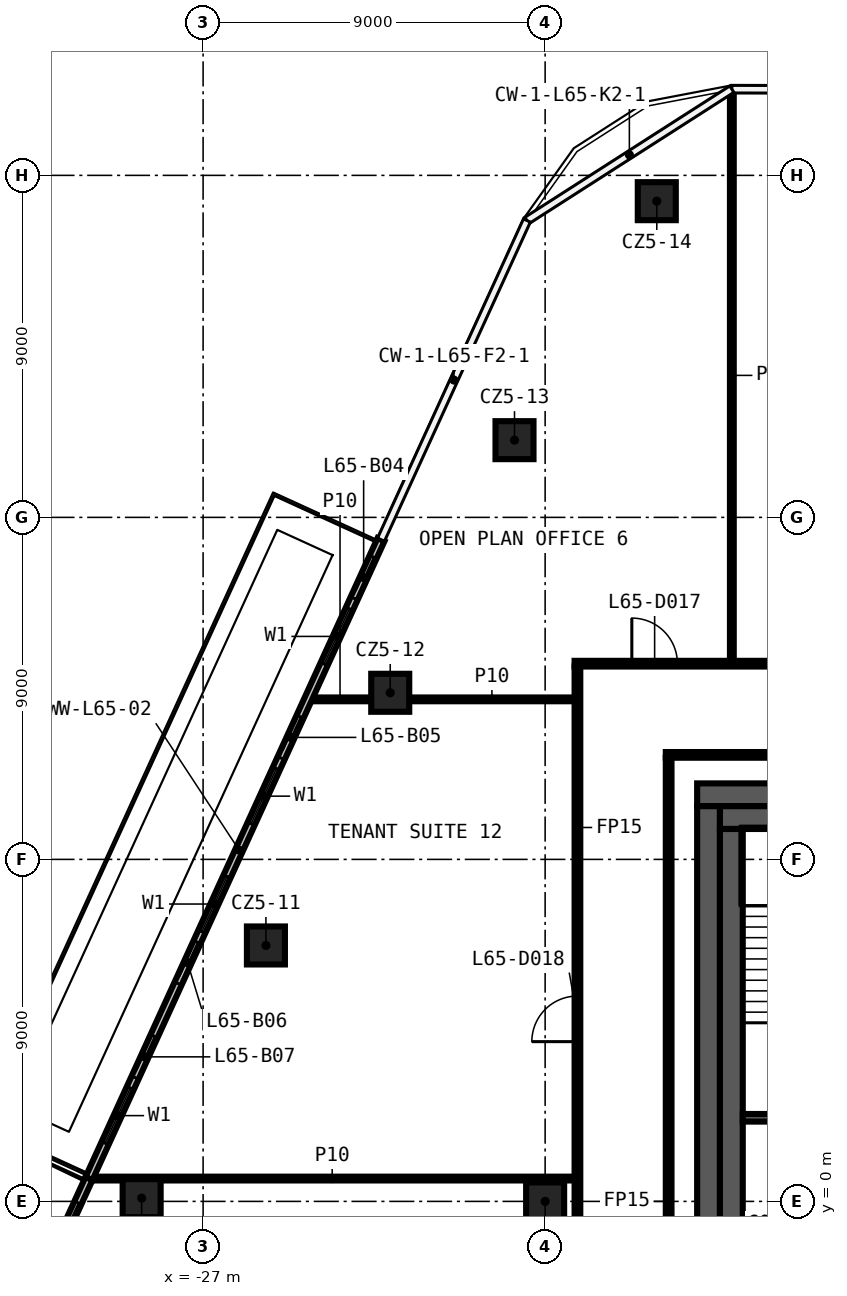
"""IFC4 building model, lengths in metres.
Left out: names, types, materials, properties, quantities, classifications, styles, units other than length and angle.
Written with IfcOpenShell. Run it as: python <this file> out.ifc"""

import sys

from ifc_helpers import new_model, si_unit, direction, frame, frame_2d, origin, origin_2d, place, context, subcontext, project, spatial, rectangle, extrude, element, fill, save


model = new_model("IFC4")
c1 = context("Model", 3, precision=1e-05, world=origin(), true_north=direction((0.0, 1.0)))
c2 = subcontext(c1, "Body", "Model", "MODEL_VIEW")
j1 = project(units=[si_unit("LENGTHUNIT", "METRE"), si_unit("PLANEANGLEUNIT", "RADIAN")], contexts=[c1])
p1 = place(None, origin())
s1 = spatial("IfcSite", under=j1, at=p1, CompositionType="ELEMENT")
p2 = place(p1, origin())
s2 = spatial("IfcBuilding", under=s1, at=p2, CompositionType="ELEMENT")
p3 = place(p2, frame((0.0, 0.0, 306.8)))
s3 = spatial("IfcBuildingStorey", under=s2, at=p3, CompositionType="ELEMENT", Elevation=306.8)
for number, where, z_axis, x_axis in (
    (1, (-28.617, 0.086, 0.0), (0.0, 0.0, 1.0), (1.0, 0.0, 0.0)),
    (2, (-25.347, 6.735, 0.0), (0.0, 0.0, 1.0), (1.0, 0.0, 0.0)),
    (3, (-22.076, 13.384, 0.0), (0.0, 0.0, 1.0), (1.0, 0.0, 0.0)),
    (4, (-18.806, 20.032, 0.0), (0.0, 0.0, 1.0), (1.0, 0.0, 0.0)),
    (5, (-15.062, 26.321, 0.0), (0.0, 0.0, 1.0), (1.0, 0.0, 0.0)),
    (6, (-18.0, 0.0, 0.0), (0.0, 0.0, 1.0), (1.0, 0.0, 0.0)),
):
    element("IfcColumn", number, at=place(p3, frame(where, z_axis=z_axis, x_axis=x_axis)), inside=s3, PredefinedType="COLUMN", context=c2, shape_type="SweptSolid", body=[
        extrude(rectangle(XDim=1.0, YDim=1.0, at=origin_2d()), origin(), (0.0, 0.0, 1.0), 3.82),
    ])
p4 = place(p3, frame((-29.981, 0.601, 0.0), z_axis=(0.0, 0.0, 1.0), x_axis=(1.0, 0.0, 0.0)))
e7 = element("IfcWall", 7, at=p4, inside=s3, PredefinedType="PARTITIONING", context=c2, shape_type="SweptSolid", body=[
    extrude(rectangle(XDim=12.756, YDim=0.1, at=frame_2d((6.378, 0.0))), origin(), (0.0, 0.0, 1.0), 3.82),
])
p5 = place(p3, frame((-14.825, 11.75, 0.0), z_axis=(0.0, 0.0, 1.0), x_axis=(1.0, 0.0, 0.0)))
e8 = element("IfcWall", 8, at=p5, inside=s3, PredefinedType="PARTITIONING", context=c2, shape_type="SweptSolid", body=[
    extrude(rectangle(XDim=16.625, YDim=0.15, at=frame_2d((8.312, 0.0))), origin(), (0.0, 0.0, 1.0), 3.82),
])
p6 = place(p3, frame((-24.218, 13.211, 0.0), z_axis=(0.0, 0.0, 1.0), x_axis=(1.0, 0.0, 0.0)))
e9 = element("IfcWall", 9, at=p6, inside=s3, PredefinedType="PARTITIONING", context=c2, shape_type="SweptSolid", body=[
    extrude(rectangle(XDim=1.642, YDim=0.1, at=frame_2d((0.821, 0.0))), origin(), (0.0, 0.0, 1.0), 3.82),
])
p7 = place(p3, frame((-21.576, 13.211, 0.0), z_axis=(0.0, 0.0, 1.0), x_axis=(1.0, 0.0, 0.0)))
e10 = element("IfcWall", 10, at=p7, inside=s3, PredefinedType="PARTITIONING", context=c2, shape_type="SweptSolid", body=[
    extrude(rectangle(XDim=4.351, YDim=0.1, at=frame_2d((2.175, 0.0))), origin(), (0.0, 0.0, 1.0), 3.82),
])
p8 = place(p3, frame((-17.225, 14.15, 0.0), z_axis=(0.0, 0.0, 1.0), x_axis=(1.0, 0.0, 0.0)))
e11 = element("IfcWall", 11, at=p8, inside=s3, PredefinedType="PARTITIONING", context=c2, shape_type="SweptSolid", body=[
    extrude(rectangle(XDim=34.45, YDim=0.15, at=frame_2d((17.225, 0.0))), origin(), (0.0, 0.0, 1.0), 3.82),
])
p9 = place(p8, frame((31.607, 0.0, 0.0)))
e12 = element("IfcOpeningElement", 12, at=p9, cuts=e11, PredefinedType="OPENING", context=c2, shape_type="SweptSolid", body=[
    extrude(rectangle(XDim=1.2, YDim=2.1, at=frame_2d((0.6, 1.05))), frame((0.0, 0.085, 0.0), z_axis=(0.0, -1.0, 0.0), x_axis=(1.0, 0.0, 0.0)), (0.0, 0.0, 1.0), 0.17),
])
p10 = place(p8, frame((25.936, 0.0, 0.0)))
e13 = element("IfcOpeningElement", 13, at=p10, cuts=e11, PredefinedType="OPENING", context=c2, shape_type="SweptSolid", body=[
    extrude(rectangle(XDim=1.2, YDim=2.1, at=frame_2d((0.6, 1.05))), frame((0.0, 0.085, 0.0), z_axis=(0.0, -1.0, 0.0), x_axis=(1.0, 0.0, 0.0)), (0.0, 0.0, 1.0), 0.17),
])
p11 = place(p8, frame((17.707, 0.0, 0.0)))
e14 = element("IfcOpeningElement", 14, at=p11, cuts=e11, PredefinedType="OPENING", context=c2, shape_type="SweptSolid", body=[
    extrude(rectangle(XDim=1.2, YDim=2.1, at=frame_2d((0.6, 1.05))), frame((0.0, 0.085, 0.0), z_axis=(0.0, -1.0, 0.0), x_axis=(1.0, 0.0, 0.0)), (0.0, 0.0, 1.0), 0.17),
])
p12 = place(p8, frame((10.617, 0.0, 0.0)))
e15 = element("IfcOpeningElement", 15, at=p12, cuts=e11, PredefinedType="OPENING", context=c2, shape_type="SweptSolid", body=[
    extrude(rectangle(XDim=1.2, YDim=2.1, at=frame_2d((0.6, 1.05))), frame((0.0, 0.085, 0.0), z_axis=(0.0, -1.0, 0.0), x_axis=(1.0, 0.0, 0.0)), (0.0, 0.0, 1.0), 0.17),
])
p13 = place(p8, frame((5.896, 0.0, 0.0)))
e16 = element("IfcOpeningElement", 16, at=p13, cuts=e11, PredefinedType="OPENING", context=c2, shape_type="SweptSolid", body=[
    extrude(rectangle(XDim=1.2, YDim=2.1, at=frame_2d((0.6, 1.05))), frame((0.0, 0.085, 0.0), z_axis=(0.0, -1.0, 0.0), x_axis=(1.0, 0.0, 0.0)), (0.0, 0.0, 1.0), 0.17),
])
p14 = place(p8, frame((1.506, 0.0, 0.0)))
e17 = element("IfcOpeningElement", 17, at=p14, cuts=e11, PredefinedType="OPENING", context=c2, shape_type="SweptSolid", body=[
    extrude(rectangle(XDim=1.2, YDim=2.1, at=frame_2d((0.6, 1.05))), frame((0.0, 0.085, 0.0), z_axis=(0.0, -1.0, 0.0), x_axis=(1.0, 0.0, 0.0)), (0.0, 0.0, 1.0), 0.17),
])
p15 = place(p3, frame((-13.087, 14.225, 0.0), z_axis=(0.0, 0.0, 1.0), x_axis=(0.0, 1.0, 0.0)))
e18 = element("IfcWall", 18, at=p15, inside=s3, PredefinedType="PARTITIONING", context=c2, shape_type="SweptSolid", body=[
    extrude(rectangle(XDim=15.023, YDim=0.1, at=frame_2d((7.511, 0.0))), origin(), (0.0, 0.0, 1.0), 3.82),
])
p16 = place(p3, frame((-14.75, -11.675, 0.0), z_axis=(0.0, 0.0, 1.0), x_axis=(0.0, 1.0, 0.0)))
e19 = element("IfcWall", 19, at=p16, inside=s3, PredefinedType="PARTITIONING", context=c2, shape_type="SweptSolid", body=[
    extrude(rectangle(XDim=23.35, YDim=0.15, at=frame_2d((11.675, 0.0))), origin(), (0.0, 0.0, 1.0), 3.82),
])
p17 = place(p3, frame((-17.15, -14.075, 0.0), z_axis=(0.0, 0.0, 1.0), x_axis=(0.0, 1.0, 0.0)))
e20 = element("IfcWall", 20, at=p17, inside=s3, PredefinedType="PARTITIONING", context=c2, shape_type="SweptSolid", body=[
    extrude(rectangle(XDim=28.15, YDim=0.15, at=frame_2d((14.075, 0.0))), origin(), (0.0, 0.0, 1.0), 3.82),
])
p18 = place(p17, frame((10.867, 0.0, 0.0)))
e21 = element("IfcOpeningElement", 21, at=p18, cuts=e20, PredefinedType="OPENING", context=c2, shape_type="SweptSolid", body=[
    extrude(rectangle(XDim=1.2, YDim=2.1, at=frame_2d((0.6, 1.05))), frame((0.0, 0.085, 0.0), z_axis=(0.0, -1.0, 0.0), x_axis=(1.0, 0.0, 0.0)), (0.0, 0.0, 1.0), 0.17),
])
p19 = place(p17, frame((3.801, 0.0, 0.0)))
e22 = element("IfcOpeningElement", 22, at=p19, cuts=e20, PredefinedType="OPENING", context=c2, shape_type="SweptSolid", body=[
    extrude(rectangle(XDim=1.2, YDim=2.1, at=frame_2d((0.6, 1.05))), frame((0.0, 0.085, 0.0), z_axis=(0.0, -1.0, 0.0), x_axis=(1.0, 0.0, 0.0)), (0.0, 0.0, 1.0), 0.17),
])
p20 = place(p17, frame((18.279, 0.0, 0.0)))
e23 = element("IfcOpeningElement", 23, at=p20, cuts=e20, PredefinedType="OPENING", context=c2, shape_type="SweptSolid", body=[
    extrude(rectangle(XDim=1.2, YDim=2.1, at=frame_2d((0.6, 1.05))), frame((0.0, 0.085, 0.0), z_axis=(0.0, -1.0, 0.0), x_axis=(1.0, 0.0, 0.0)), (0.0, 0.0, 1.0), 0.17),
])
p21 = place(p3, frame((-22.318, 17.414, 0.0), z_axis=(0.0, 0.0, 1.0), x_axis=(-0.415710447513, -0.909497016943, 0.0)))
e24 = element("IfcWall", 24, at=p21, inside=s3, PredefinedType="SOLIDWALL", context=c2, shape_type="SweptSolid", body=[
    extrude(rectangle(XDim=18.487, YDim=0.2, at=frame_2d((9.243, 0.0))), origin(), (0.0, 0.0, 1.0), 3.82),
])
p22 = place(p21, frame((2.0, 0.0, 0.6)))
e25 = element("IfcOpeningElement", 25, at=p22, cuts=e24, PredefinedType="OPENING", context=c2, shape_type="SweptSolid", body=[
    extrude(rectangle(XDim=1.6, YDim=2.4, at=frame_2d((0.8, 1.2))), frame((0.0, 0.11, 0.0), z_axis=(0.0, -1.0, 0.0), x_axis=(1.0, 0.0, 0.0)), (0.0, 0.0, 1.0), 0.22),
])
p23 = place(p21, frame((0.5, 0.0, 0.0)))
e26 = element("IfcOpeningElement", 26, at=p23, cuts=e24, PredefinedType="OPENING", context=c2, shape_type="SweptSolid", body=[
    extrude(rectangle(XDim=1.2, YDim=2.4, at=frame_2d((0.6, 1.2))), frame((0.0, 0.11, 0.0), z_axis=(0.0, -1.0, 0.0), x_axis=(1.0, 0.0, 0.0)), (0.0, 0.0, 1.0), 0.22),
])
p24 = place(p21, frame((6.622, 0.0, 0.6)))
e27 = element("IfcOpeningElement", 27, at=p24, cuts=e24, PredefinedType="OPENING", context=c2, shape_type="SweptSolid", body=[
    extrude(rectangle(XDim=1.6, YDim=2.4, at=frame_2d((0.8, 1.2))), frame((0.0, 0.11, 0.0), z_axis=(0.0, -1.0, 0.0), x_axis=(1.0, 0.0, 0.0)), (0.0, 0.0, 1.0), 0.22),
])
p25 = place(p21, frame((5.122, 0.0, 0.0)))
e28 = element("IfcOpeningElement", 28, at=p25, cuts=e24, PredefinedType="OPENING", context=c2, shape_type="SweptSolid", body=[
    extrude(rectangle(XDim=1.2, YDim=2.4, at=frame_2d((0.6, 1.2))), frame((0.0, 0.11, 0.0), z_axis=(0.0, -1.0, 0.0), x_axis=(1.0, 0.0, 0.0)), (0.0, 0.0, 1.0), 0.22),
])
p26 = place(p21, frame((9.743, 0.0, 0.6)))
e29 = element("IfcOpeningElement", 29, at=p26, cuts=e24, PredefinedType="OPENING", context=c2, shape_type="SweptSolid", body=[
    extrude(rectangle(XDim=1.6, YDim=2.4, at=frame_2d((0.8, 1.2))), frame((0.0, 0.11, 0.0), z_axis=(0.0, -1.0, 0.0), x_axis=(1.0, 0.0, 0.0)), (0.0, 0.0, 1.0), 0.22),
])
p27 = place(p21, frame((11.643, 0.0, 0.0)))
e30 = element("IfcOpeningElement", 30, at=p27, cuts=e24, PredefinedType="OPENING", context=c2, shape_type="SweptSolid", body=[
    extrude(rectangle(XDim=1.2, YDim=2.4, at=frame_2d((0.6, 1.2))), frame((0.0, 0.11, 0.0), z_axis=(0.0, -1.0, 0.0), x_axis=(1.0, 0.0, 0.0)), (0.0, 0.0, 1.0), 0.22),
])
p28 = place(p21, frame((15.865, 0.0, 0.6)))
e31 = element("IfcOpeningElement", 31, at=p28, cuts=e24, PredefinedType="OPENING", context=c2, shape_type="SweptSolid", body=[
    extrude(rectangle(XDim=1.6, YDim=2.4, at=frame_2d((0.8, 1.2))), frame((0.0, 0.11, 0.0), z_axis=(0.0, -1.0, 0.0), x_axis=(1.0, 0.0, 0.0)), (0.0, 0.0, 1.0), 0.22),
])
p29 = place(p21, frame((14.365, 0.0, 0.0)))
e32 = element("IfcOpeningElement", 32, at=p29, cuts=e24, PredefinedType="OPENING", context=c2, shape_type="SweptSolid", body=[
    extrude(rectangle(XDim=1.2, YDim=2.4, at=frame_2d((0.6, 1.2))), frame((0.0, 0.11, 0.0), z_axis=(0.0, -1.0, 0.0), x_axis=(1.0, 0.0, 0.0)), (0.0, 0.0, 1.0), 0.22),
])
p30 = place(p3, frame((-30.003, 0.601, 0.0), z_axis=(0.0, 0.0, 1.0), x_axis=(-0.415728482872, -0.909488773174, 0.0)))
e33 = element("IfcWall", 33, at=p30, inside=s3, PredefinedType="SOLIDWALL", context=c2, shape_type="SweptSolid", body=[
    extrude(rectangle(XDim=4.612, YDim=0.2, at=frame_2d((2.306, 0.0))), origin(), (0.0, 0.0, 1.0), 3.82),
])
p31 = place(p30, frame((2.2, 0.0, 0.6)))
e34 = element("IfcOpeningElement", 34, at=p31, cuts=e33, PredefinedType="OPENING", context=c2, shape_type="SweptSolid", body=[
    extrude(rectangle(XDim=1.6, YDim=2.4, at=frame_2d((0.8, 1.2))), frame((0.0, 0.11, 0.0), z_axis=(0.0, -1.0, 0.0), x_axis=(1.0, 0.0, 0.0)), (0.0, 0.0, 1.0), 0.22),
])
p32 = place(p30, frame((0.7, 0.0, 0.0)))
e35 = element("IfcOpeningElement", 35, at=p32, cuts=e33, PredefinedType="OPENING", context=c2, shape_type="SweptSolid", body=[
    extrude(rectangle(XDim=1.2, YDim=2.4, at=frame_2d((0.6, 1.2))), frame((0.0, 0.11, 0.0), z_axis=(0.0, -1.0, 0.0), x_axis=(1.0, 0.0, 0.0)), (0.0, 0.0, 1.0), 0.22),
])
p33 = place(p3, frame((-14.0, 10.7, 0.0), z_axis=(0.0, 0.0, 1.0), x_axis=(1.0, 0.0, 0.0)))
e36 = element("IfcWall", 36, at=p33, inside=s3, PredefinedType="SHEAR", context=c2, shape_type="SweptSolid", body=[
    extrude(rectangle(XDim=28.0, YDim=0.6, at=frame_2d((14.0, 0.0))), origin(), (0.0, 0.0, 1.0), 3.82),
])
p34 = place(p33, frame((15.9, 0.0, 0.0)))
e37 = element("IfcOpeningElement", 37, at=p34, cuts=e36, PredefinedType="OPENING", context=c2, shape_type="SweptSolid", body=[
    extrude(rectangle(XDim=1.6, YDim=2.1, at=frame_2d((0.8, 1.05))), frame((0.0, 0.31, 0.0), z_axis=(0.0, -1.0, 0.0), x_axis=(1.0, 0.0, 0.0)), (0.0, 0.0, 1.0), 0.62),
])
p35 = place(p3, frame((-13.7, -10.4, 0.0), z_axis=(0.0, 0.0, 1.0), x_axis=(0.0, 1.0, 0.0)))
e38 = element("IfcWall", 38, at=p35, inside=s3, PredefinedType="SHEAR", context=c2, shape_type="SweptSolid", body=[
    extrude(rectangle(XDim=20.8, YDim=0.6, at=frame_2d((10.4, 0.0))), origin(), (0.0, 0.0, 1.0), 3.82),
])
p36 = place(p3, frame((-13.4, 10.1, 0.0), z_axis=(0.0, 0.0, 1.0), x_axis=(1.0, 0.0, 0.0)))
e39 = element("IfcWall", 39, at=p36, inside=s3, PredefinedType="SHEAR", context=c2, shape_type="SweptSolid", body=[
    extrude(rectangle(XDim=14.9, YDim=0.6, at=frame_2d((7.45, 0.0))), origin(), (0.0, 0.0, 1.0), 3.82),
])
p37 = place(p3, frame((-13.1, -9.8, 0.0), z_axis=(0.0, 0.0, 1.0), x_axis=(0.0, 1.0, 0.0)))
e40 = element("IfcWall", 40, at=p37, inside=s3, PredefinedType="SHEAR", context=c2, shape_type="SweptSolid", body=[
    extrude(rectangle(XDim=19.6, YDim=0.6, at=frame_2d((9.8, 0.0))), origin(), (0.0, 0.0, 1.0), 3.82),
])
p38 = place(p3, frame((-9.45, 2.2, 0.0), z_axis=(0.0, 0.0, 1.0), x_axis=(-1.0, 0.0, 0.0)))
e41 = element("IfcWall", 41, at=p38, inside=s3, PredefinedType="SHEAR", context=c2, shape_type="SweptSolid", body=[
    extrude(rectangle(XDim=3.35, YDim=0.2, at=frame_2d((1.675, 0.0))), origin(), (0.0, 0.0, 1.0), 3.82),
])
p39 = place(p14, origin())
e42 = element("IfcDoor", 42, at=p39, inside=s3, OperationType="SINGLE_SWING_RIGHT", PredefinedType="DOOR", context=c2, shape_type="SweptSolid", body=[
    extrude(rectangle(XDim=1.2, YDim=2.1, at=frame_2d((0.6, 1.05))), frame((0.0, 0.025, 0.0), z_axis=(0.0, -1.0, 0.0), x_axis=(1.0, 0.0, 0.0)), (0.0, 0.0, 1.0), 0.05),
])
fill(e17, e42)
p40 = place(p20, origin())
e43 = element("IfcDoor", 43, at=p40, inside=s3, OperationType="SINGLE_SWING_LEFT", PredefinedType="DOOR", context=c2, shape_type="SweptSolid", body=[
    extrude(rectangle(XDim=1.2, YDim=2.1, at=frame_2d((0.6, 1.05))), frame((0.0, 0.025, 0.0), z_axis=(0.0, -1.0, 0.0), x_axis=(1.0, 0.0, 0.0)), (0.0, 0.0, 1.0), 0.05),
])
fill(e23, e43)
p41 = place(p22, origin())
e44 = element("IfcWindow", 44, at=p41, inside=s3, PartitioningType="SINGLE_PANEL", PredefinedType="WINDOW", context=c2, shape_type="SweptSolid", body=[
    extrude(rectangle(XDim=1.6, YDim=2.4, at=frame_2d((0.8, 1.2))), frame((0.0, 0.03, 0.0), z_axis=(0.0, -1.0, 0.0), x_axis=(1.0, 0.0, 0.0)), (0.0, 0.0, 1.0), 0.06),
])
fill(e25, e44)
p42 = place(p23, origin())
e45 = element("IfcDoor", 45, at=p42, inside=s3, OperationType="SLIDING_TO_LEFT", PredefinedType="DOOR", context=c2, shape_type="SweptSolid", body=[
    extrude(rectangle(XDim=1.2, YDim=2.4, at=frame_2d((0.6, 1.2))), frame((0.0, 0.025, 0.0), z_axis=(0.0, -1.0, 0.0), x_axis=(1.0, 0.0, 0.0)), (0.0, 0.0, 1.0), 0.05),
])
fill(e26, e45)
p43 = place(p24, origin())
e46 = element("IfcWindow", 46, at=p43, inside=s3, PartitioningType="SINGLE_PANEL", PredefinedType="WINDOW", context=c2, shape_type="SweptSolid", body=[
    extrude(rectangle(XDim=1.6, YDim=2.4, at=frame_2d((0.8, 1.2))), frame((0.0, 0.03, 0.0), z_axis=(0.0, -1.0, 0.0), x_axis=(1.0, 0.0, 0.0)), (0.0, 0.0, 1.0), 0.06),
])
fill(e27, e46)
p44 = place(p25, origin())
e47 = element("IfcDoor", 47, at=p44, inside=s3, OperationType="SLIDING_TO_LEFT", PredefinedType="DOOR", context=c2, shape_type="SweptSolid", body=[
    extrude(rectangle(XDim=1.2, YDim=2.4, at=frame_2d((0.6, 1.2))), frame((0.0, 0.025, 0.0), z_axis=(0.0, -1.0, 0.0), x_axis=(1.0, 0.0, 0.0)), (0.0, 0.0, 1.0), 0.05),
])
fill(e28, e47)
p45 = place(p26, origin())
e48 = element("IfcWindow", 48, at=p45, inside=s3, PartitioningType="SINGLE_PANEL", PredefinedType="WINDOW", context=c2, shape_type="SweptSolid", body=[
    extrude(rectangle(XDim=1.6, YDim=2.4, at=frame_2d((0.8, 1.2))), frame((0.0, 0.03, 0.0), z_axis=(0.0, -1.0, 0.0), x_axis=(1.0, 0.0, 0.0)), (0.0, 0.0, 1.0), 0.06),
])
fill(e29, e48)
p46 = place(p27, origin())
e49 = element("IfcDoor", 49, at=p46, inside=s3, OperationType="SLIDING_TO_LEFT", PredefinedType="DOOR", context=c2, shape_type="SweptSolid", body=[
    extrude(rectangle(XDim=1.2, YDim=2.4, at=frame_2d((0.6, 1.2))), frame((0.0, 0.025, 0.0), z_axis=(0.0, -1.0, 0.0), x_axis=(1.0, 0.0, 0.0)), (0.0, 0.0, 1.0), 0.05),
])
fill(e30, e49)
p47 = place(p28, origin())
e50 = element("IfcWindow", 50, at=p47, inside=s3, PartitioningType="SINGLE_PANEL", PredefinedType="WINDOW", context=c2, shape_type="SweptSolid", body=[
    extrude(rectangle(XDim=1.6, YDim=2.4, at=frame_2d((0.8, 1.2))), frame((0.0, 0.03, 0.0), z_axis=(0.0, -1.0, 0.0), x_axis=(1.0, 0.0, 0.0)), (0.0, 0.0, 1.0), 0.06),
])
fill(e31, e50)
p48 = place(p29, origin())
e51 = element("IfcDoor", 51, at=p48, inside=s3, OperationType="SLIDING_TO_LEFT", PredefinedType="DOOR", context=c2, shape_type="SweptSolid", body=[
    extrude(rectangle(XDim=1.2, YDim=2.4, at=frame_2d((0.6, 1.2))), frame((0.0, 0.025, 0.0), z_axis=(0.0, -1.0, 0.0), x_axis=(1.0, 0.0, 0.0)), (0.0, 0.0, 1.0), 0.05),
])
fill(e32, e51)
p49 = place(p32, origin())
e52 = element("IfcDoor", 52, at=p49, inside=s3, OperationType="SLIDING_TO_LEFT", PredefinedType="DOOR", context=c2, shape_type="SweptSolid", body=[
    extrude(rectangle(XDim=1.2, YDim=2.4, at=frame_2d((0.6, 1.2))), frame((0.0, 0.025, 0.0), z_axis=(0.0, -1.0, 0.0), x_axis=(1.0, 0.0, 0.0)), (0.0, 0.0, 1.0), 0.05),
])
fill(e35, e52)
save(model, sys.argv[1])
